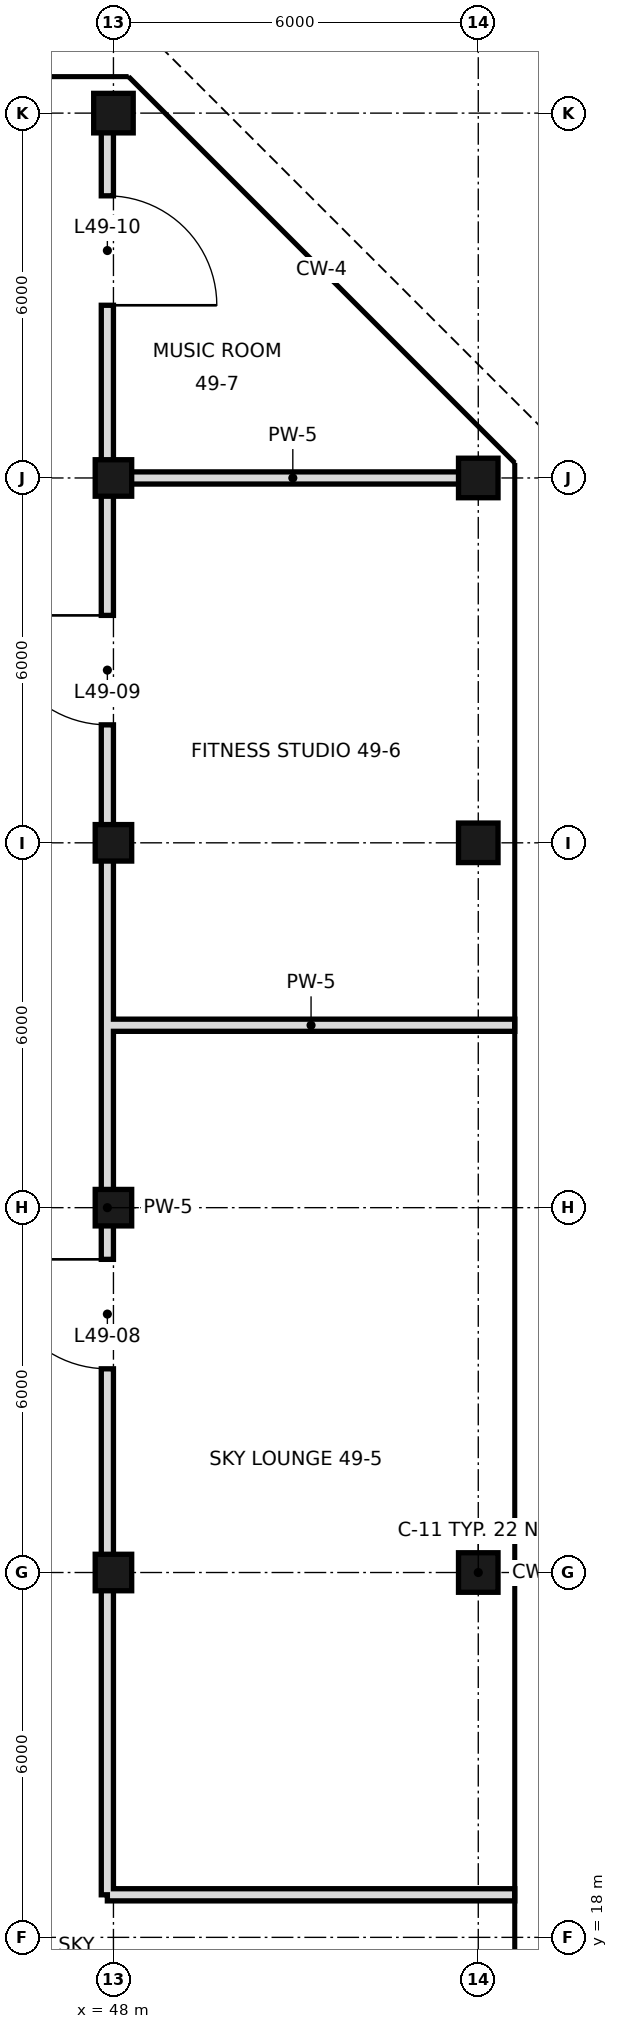
"""IFC4 building model, lengths in metres.
Left out: names, types, materials, properties, quantities, classifications, styles, units other than length and angle.
Written with IfcOpenShell. Run it as: python <this file> out.ifc"""

import sys

from ifc_helpers import new_model, si_unit, direction, frame, frame_2d, origin, origin_2d, place, context, subcontext, project, spatial, rectangle, hollow_rectangle, extrude, element, fill, save


model = new_model("IFC4")
c1 = context("Model", 3, precision=1e-05, world=origin(), true_north=direction((0.0, 1.0)))
c2 = subcontext(c1, "Body", "Model", "MODEL_VIEW")
j1 = project(units=[si_unit("LENGTHUNIT", "METRE"), si_unit("PLANEANGLEUNIT", "RADIAN")], contexts=[c1])
p1 = place(None, origin())
s1 = spatial("IfcSite", under=j1, at=p1, CompositionType="ELEMENT")
p2 = place(p1, origin())
s2 = spatial("IfcBuilding", under=s1, at=p2, CompositionType="ELEMENT")
p3 = place(p2, frame((0.0, 0.0, 210.0)))
s3 = spatial("IfcBuildingStorey", under=s2, at=p3, CompositionType="ELEMENT", Elevation=210.0)
for number, where, z_axis, x_axis in (
    (1, (48.0, 24.0, 0.0), (0.0, 0.0, 1.0), (1.0, 0.0, 0.0)),
    (2, (48.0, 30.0, 0.0), (0.0, 0.0, 1.0), (1.0, 0.0, 0.0)),
    (3, (48.0, 36.0, 0.0), (0.0, 0.0, 1.0), (1.0, 0.0, 0.0)),
    (4, (48.0, 42.0, 0.0), (0.0, 0.0, 1.0), (1.0, 0.0, 0.0)),
):
    element("IfcColumn", number, at=place(p3, frame(where, z_axis=z_axis, x_axis=x_axis)), inside=s3, PredefinedType="COLUMN", context=c2, shape_type="SweptSolid", body=[
        extrude(hollow_rectangle(XDim=0.6, YDim=0.6, WallThickness=0.028, at=origin_2d()), origin(), (0.0, 0.0, 1.0), 5.4),
    ])
for number, where, z_axis, x_axis in (
    (5, (48.0, 48.0, 0.0), (0.0, 0.0, 1.0), (1.0, 0.0, 0.0)),
    (6, (54.0, 24.0, 0.0), (0.0, 0.0, 1.0), (1.0, 0.0, 0.0)),
    (7, (54.0, 36.0, 0.0), (0.0, 0.0, 1.0), (1.0, 0.0, 0.0)),
    (8, (54.0, 42.0, 0.0), (0.0, 0.0, 1.0), (1.0, 0.0, 0.0)),
):
    element("IfcColumn", number, at=place(p3, frame(where, z_axis=z_axis, x_axis=x_axis)), inside=s3, PredefinedType="COLUMN", context=c2, shape_type="SweptSolid", body=[
        extrude(hollow_rectangle(XDim=0.65, YDim=0.65, WallThickness=0.032, at=origin_2d()), origin(), (0.0, 0.0, 1.0), 5.4),
    ])
p4 = place(p3, frame((47.9, 18.7, 0.0), z_axis=(0.0, 0.0, 1.0), x_axis=(0.0, 1.0, 0.0)))
e9 = element("IfcWall", 9, at=p4, inside=s3, PredefinedType="SOLIDWALL", context=c2, shape_type="SweptSolid", body=[
    extrude(rectangle(XDim=29.3, YDim=0.2, at=frame_2d((14.65, 0.0))), origin(), (0.0, 0.0, 1.0), 4.52),
])
p5 = place(p4, frame((8.65, 0.0, 0.0)))
e10 = element("IfcOpeningElement", 10, at=p5, cuts=e9, PredefinedType="OPENING", context=c2, shape_type="SweptSolid", body=[
    extrude(rectangle(XDim=1.8, YDim=2.4, at=frame_2d((0.9, 1.2))), frame((0.0, 0.11, 0.0), z_axis=(0.0, -1.0, 0.0), x_axis=(1.0, 0.0, 0.0)), (0.0, 0.0, 1.0), 0.22),
])
p6 = place(p4, frame((19.24, 0.0, 0.0)))
e11 = element("IfcOpeningElement", 11, at=p6, cuts=e9, PredefinedType="OPENING", context=c2, shape_type="SweptSolid", body=[
    extrude(rectangle(XDim=1.8, YDim=2.4, at=frame_2d((0.9, 1.2))), frame((0.0, 0.11, 0.0), z_axis=(0.0, -1.0, 0.0), x_axis=(1.0, 0.0, 0.0)), (0.0, 0.0, 1.0), 0.22),
])
p7 = place(p4, frame((26.14, 0.0, 0.0)))
e12 = element("IfcOpeningElement", 12, at=p7, cuts=e9, PredefinedType="OPENING", context=c2, shape_type="SweptSolid", body=[
    extrude(rectangle(XDim=1.8, YDim=2.4, at=frame_2d((0.9, 1.2))), frame((0.0, 0.11, 0.0), z_axis=(0.0, -1.0, 0.0), x_axis=(1.0, 0.0, 0.0)), (0.0, 0.0, 1.0), 0.22),
])
for number, where, z_axis, x_axis in (
    (13, (47.9, 18.7, 0.0), (0.0, 0.0, 1.0), (1.0, 0.0, 0.0)),
    (14, (47.9, 33.0, 0.0), (0.0, 0.0, 1.0), (1.0, 0.0, 0.0)),
):
    element("IfcWall", number, at=place(p3, frame(where, z_axis=z_axis, x_axis=x_axis)), inside=s3, PredefinedType="SOLIDWALL", context=c2, shape_type="SweptSolid", body=[
        extrude(rectangle(XDim=6.7, YDim=0.2, at=frame_2d((3.35, 0.0))), origin(), (0.0, 0.0, 1.0), 4.52),
    ])
p8 = place(p3, frame((47.9, 42.0, 0.0), z_axis=(0.0, 0.0, 1.0), x_axis=(1.0, 0.0, 0.0)))
e15 = element("IfcWall", 15, at=p8, inside=s3, PredefinedType="SOLIDWALL", context=c2, shape_type="SweptSolid", body=[
    extrude(rectangle(XDim=6.1, YDim=0.2, at=frame_2d((3.05, 0.0))), origin(), (0.0, 0.0, 1.0), 4.77),
])
p9 = place(p5, frame((1.8, 0.0, 0.0), z_axis=(0.0, 0.0, 1.0), x_axis=(-1.0, 0.0, 0.0)))
e16 = element("IfcDoor", 16, at=p9, inside=s3, OperationType="SINGLE_SWING_LEFT", PredefinedType="DOOR", context=c2, shape_type="SweptSolid", body=[
    extrude(rectangle(XDim=1.8, YDim=2.4, at=frame_2d((0.9, 1.2))), frame((0.0, 0.025, 0.0), z_axis=(0.0, -1.0, 0.0), x_axis=(1.0, 0.0, 0.0)), (0.0, 0.0, 1.0), 0.05),
])
fill(e10, e16)
p10 = place(p6, frame((1.8, 0.0, 0.0), z_axis=(0.0, 0.0, 1.0), x_axis=(-1.0, 0.0, 0.0)))
e17 = element("IfcDoor", 17, at=p10, inside=s3, OperationType="SINGLE_SWING_LEFT", PredefinedType="DOOR", context=c2, shape_type="SweptSolid", body=[
    extrude(rectangle(XDim=1.8, YDim=2.4, at=frame_2d((0.9, 1.2))), frame((0.0, 0.025, 0.0), z_axis=(0.0, -1.0, 0.0), x_axis=(1.0, 0.0, 0.0)), (0.0, 0.0, 1.0), 0.05),
])
fill(e11, e17)
p11 = place(p7, frame((1.8, 0.0, 0.0), z_axis=(0.0, 0.0, 1.0), x_axis=(-1.0, 0.0, 0.0)))
e18 = element("IfcDoor", 18, at=p11, inside=s3, OperationType="SINGLE_SWING_RIGHT", PredefinedType="DOOR", context=c2, shape_type="SweptSolid", body=[
    extrude(rectangle(XDim=1.8, YDim=2.4, at=frame_2d((0.9, 1.2))), frame((0.0, 0.025, 0.0), z_axis=(0.0, -1.0, 0.0), x_axis=(1.0, 0.0, 0.0)), (0.0, 0.0, 1.0), 0.05),
])
fill(e12, e18)
save(model, sys.argv[1])
